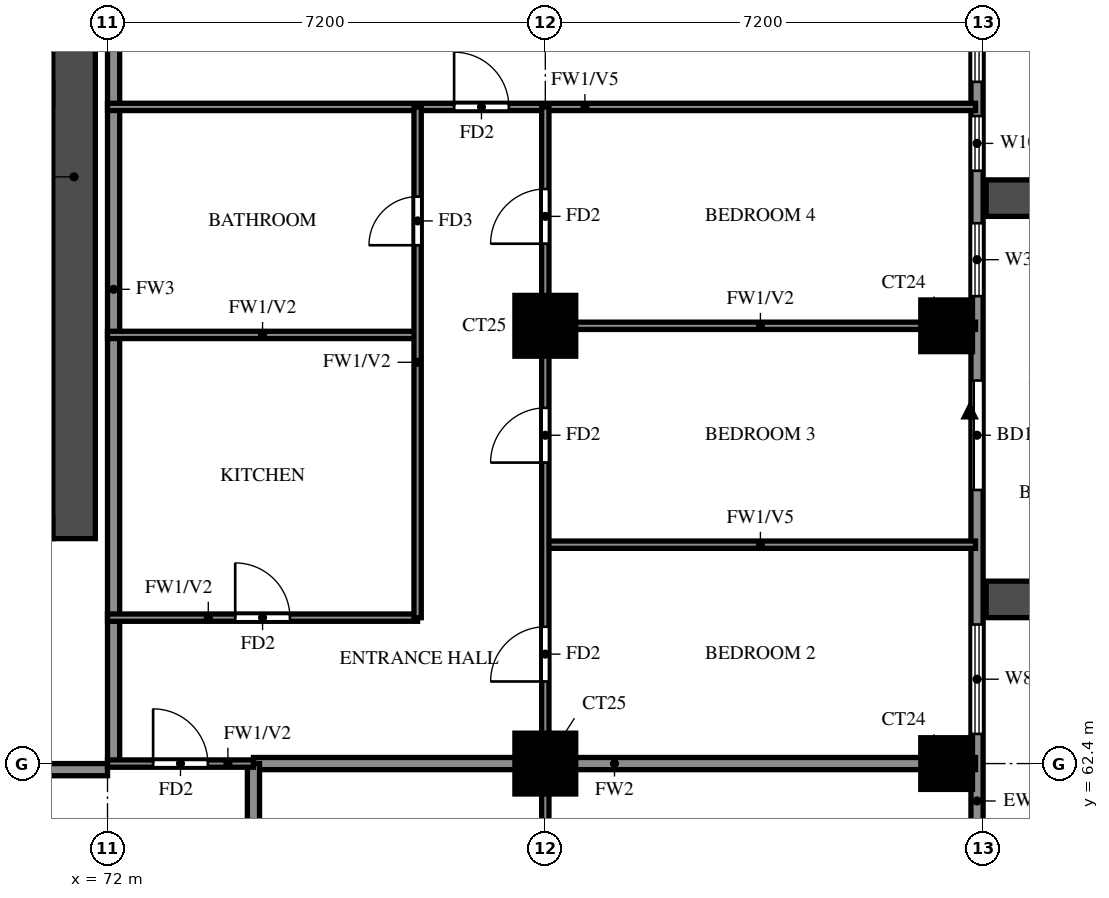
"""IFC4 building model, lengths in metres.
Left out: names, types, materials, properties, quantities, classifications, styles, units other than length and angle.
Written with IfcOpenShell. Run it as: python <this file> out.ifc"""

import sys

from ifc_helpers import new_model, si_unit, direction, frame, frame_2d, origin, origin_2d, place, context, subcontext, project, spatial, rectangle, extrude, source, transform, mapped, element, fill, save


model = new_model("IFC4")
c1 = context("Model", 3, precision=1e-05, world=origin(), true_north=direction((0.0, 1.0)))
c2 = subcontext(c1, "Body", "Model", "MODEL_VIEW")
j1 = project(units=[si_unit("LENGTHUNIT", "METRE"), si_unit("PLANEANGLEUNIT", "RADIAN")], contexts=[c1])
p1 = place(None, origin())
s1 = spatial("IfcSite", under=j1, at=p1, CompositionType="ELEMENT")
p2 = place(p1, origin())
s2 = spatial("IfcBuilding", under=s1, at=p2, CompositionType="ELEMENT")
p3 = place(p2, frame((0.0, 0.0, 160.5)))
s3 = spatial("IfcBuildingStorey", under=s2, at=p3, CompositionType="ELEMENT", Elevation=160.5)
m1 = source(origin(), c2, "Body", "SweptSolid", [
    extrude(rectangle(XDim=1.0, YDim=1.0, at=origin_2d()), origin(), (0.0, 0.0, 1.0), 3.2),
])
p4 = place(p3, frame((79.2, 62.4, 0.0), z_axis=(0.0, 0.0, 1.0), x_axis=(1.0, 0.0, 0.0)))
e1 = element("IfcColumn", 1, at=p4, inside=s3, PredefinedType="COLUMN", context=c2, shape_type="MappedRepresentation", body=[
    mapped(m1, transform((0.0, 0.0, 0.0))),
])
m2 = source(origin(), c2, "Body", "SweptSolid", [
    extrude(rectangle(XDim=0.85, YDim=0.85, at=origin_2d()), origin(), (0.0, 0.0, 1.0), 3.2),
])
p5 = place(p3, frame((85.8, 62.4, 0.0), z_axis=(0.0, 0.0, 1.0), x_axis=(1.0, 0.0, 0.0)))
e2 = element("IfcColumn", 2, at=p5, inside=s3, PredefinedType="COLUMN", context=c2, shape_type="MappedRepresentation", body=[
    mapped(m2, transform((0.0, 0.0, 0.0))),
])
p6 = place(p3, frame((79.2, 69.6, 0.0), z_axis=(0.0, 0.0, 1.0), x_axis=(1.0, 0.0, 0.0)))
e3 = element("IfcColumn", 3, at=p6, inside=s3, PredefinedType="COLUMN", context=c2, shape_type="MappedRepresentation", body=[
    mapped(m1, transform((0.0, 0.0, 0.0))),
])
p7 = place(p3, frame((85.8, 69.6, 0.0), z_axis=(0.0, 0.0, 1.0), x_axis=(1.0, 0.0, 0.0)))
e4 = element("IfcColumn", 4, at=p7, inside=s3, PredefinedType="COLUMN", context=c2, shape_type="MappedRepresentation", body=[
    mapped(m2, transform((0.0, 0.0, 0.0))),
])
p8 = place(p3, frame((71.45, 66.1, 0.0), z_axis=(0.0, 0.0, 1.0), x_axis=(0.0, 1.0, 0.0)))
e5 = element("IfcWall", 5, at=p8, inside=s3, PredefinedType="SHEAR", context=c2, shape_type="SweptSolid", body=[
    extrude(rectangle(XDim=11.9, YDim=0.7, at=frame_2d((5.95, 0.0))), origin(), (0.0, 0.0, 1.0), 3.2),
])
p9 = place(p3, frame((29.7, 66.275, 0.0), z_axis=(0.0, 0.0, 1.0), x_axis=(1.0, 0.0, 0.0)))
e6 = element("IfcWall", 6, at=p9, inside=s3, PredefinedType="SHEAR", context=c2, shape_type="SweptSolid", body=[
    extrude(rectangle(XDim=41.4, YDim=0.35, at=frame_2d((20.7, 0.0))), origin(), (0.0, 0.0, 1.0), 3.2),
])
p10 = place(p9, frame((0.925, 0.0, 0.0)))
e7 = element("IfcOpeningElement", 7, at=p10, cuts=e6, PredefinedType="OPENING", context=c2, shape_type="SweptSolid", body=[
    extrude(rectangle(XDim=1.1, YDim=2.1, at=frame_2d((0.55, 1.05))), frame((0.0, 0.185, 0.0), z_axis=(0.0, -1.0, 0.0), x_axis=(1.0, 0.0, 0.0)), (0.0, 0.0, 1.0), 0.37),
])
p11 = place(p9, frame((3.712, 0.0, 0.0)))
e8 = element("IfcOpeningElement", 8, at=p11, cuts=e6, PredefinedType="OPENING", context=c2, shape_type="SweptSolid", body=[
    extrude(rectangle(XDim=1.8, YDim=2.1, at=frame_2d((0.9, 1.05))), frame((0.0, 0.185, 0.0), z_axis=(0.0, -1.0, 0.0), x_axis=(1.0, 0.0, 0.0)), (0.0, 0.0, 1.0), 0.37),
])
p12 = place(p3, frame((86.3, 48.2, 0.0), z_axis=(0.0, 0.0, 1.0), x_axis=(0.0, 1.0, 0.0)))
e9 = element("IfcWall", 9, at=p12, inside=s3, PredefinedType="SOLIDWALL", context=c2, shape_type="SweptSolid", body=[
    extrude(rectangle(XDim=28.6, YDim=0.2, at=frame_2d((14.3, 0.0))), origin(), (0.0, 0.0, 1.0), 3.2),
])
p13 = place(p12, frame((4.3, 0.0, 0.0)))
e10 = element("IfcOpeningElement", 10, at=p13, cuts=e9, PredefinedType="OPENING", context=c2, shape_type="SweptSolid", body=[
    extrude(rectangle(XDim=1.8, YDim=2.4, at=frame_2d((0.9, 1.2))), frame((0.0, 0.11, 0.0), z_axis=(0.0, -1.0, 0.0), x_axis=(1.0, 0.0, 0.0)), (0.0, 0.0, 1.0), 0.22),
])
p14 = place(p12, frame((18.7, 0.0, 0.0)))
e11 = element("IfcOpeningElement", 11, at=p14, cuts=e9, PredefinedType="OPENING", context=c2, shape_type="SweptSolid", body=[
    extrude(rectangle(XDim=1.8, YDim=2.4, at=frame_2d((0.9, 1.2))), frame((0.0, 0.11, 0.0), z_axis=(0.0, -1.0, 0.0), x_axis=(1.0, 0.0, 0.0)), (0.0, 0.0, 1.0), 0.22),
])
p15 = place(p12, frame((0.6, 0.0, 0.6)))
e12 = element("IfcOpeningElement", 12, at=p15, cuts=e9, PredefinedType="OPENING", context=c2, shape_type="SweptSolid", body=[
    extrude(rectangle(XDim=1.2, YDim=2.4, at=frame_2d((0.6, 1.2))), frame((0.0, 0.11, 0.0), z_axis=(0.0, -1.0, 0.0), x_axis=(1.0, 0.0, 0.0)), (0.0, 0.0, 1.0), 0.22),
])
p16 = place(p12, frame((7.488, 0.0, 0.6)))
e13 = element("IfcOpeningElement", 13, at=p16, cuts=e9, PredefinedType="OPENING", context=c2, shape_type="SweptSolid", body=[
    extrude(rectangle(XDim=1.2, YDim=2.4, at=frame_2d((0.6, 1.2))), frame((0.0, 0.11, 0.0), z_axis=(0.0, -1.0, 0.0), x_axis=(1.0, 0.0, 0.0)), (0.0, 0.0, 1.0), 0.22),
])
p17 = place(p12, frame((10.413, 0.0, 0.6)))
e14 = element("IfcOpeningElement", 14, at=p17, cuts=e9, PredefinedType="OPENING", context=c2, shape_type="SweptSolid", body=[
    extrude(rectangle(XDim=2.4, YDim=2.4, at=frame_2d((1.2, 1.2))), frame((0.0, 0.11, 0.0), z_axis=(0.0, -1.0, 0.0), x_axis=(1.0, 0.0, 0.0)), (0.0, 0.0, 1.0), 0.22),
])
p18 = place(p12, frame((14.688, 0.0, 0.6)))
e15 = element("IfcOpeningElement", 15, at=p18, cuts=e9, PredefinedType="OPENING", context=c2, shape_type="SweptSolid", body=[
    extrude(rectangle(XDim=1.8, YDim=2.4, at=frame_2d((0.9, 1.2))), frame((0.0, 0.11, 0.0), z_axis=(0.0, -1.0, 0.0), x_axis=(1.0, 0.0, 0.0)), (0.0, 0.0, 1.0), 0.22),
])
p19 = place(p12, frame((21.887, 0.0, 0.6)))
e16 = element("IfcOpeningElement", 16, at=p19, cuts=e9, PredefinedType="OPENING", context=c2, shape_type="SweptSolid", body=[
    extrude(rectangle(XDim=1.2, YDim=2.4, at=frame_2d((0.6, 1.2))), frame((0.0, 0.11, 0.0), z_axis=(0.0, -1.0, 0.0), x_axis=(1.0, 0.0, 0.0)), (0.0, 0.0, 1.0), 0.22),
])
p20 = place(p12, frame((23.95, 0.0, 0.6)))
e17 = element("IfcOpeningElement", 17, at=p20, cuts=e9, PredefinedType="OPENING", context=c2, shape_type="SweptSolid", body=[
    extrude(rectangle(XDim=0.9, YDim=2.4, at=frame_2d((0.45, 1.2))), frame((0.0, 0.11, 0.0), z_axis=(0.0, -1.0, 0.0), x_axis=(1.0, 0.0, 0.0)), (0.0, 0.0, 1.0), 0.22),
])
p21 = place(p12, frame((25.413, 0.0, 0.6)))
e18 = element("IfcOpeningElement", 18, at=p21, cuts=e9, PredefinedType="OPENING", context=c2, shape_type="SweptSolid", body=[
    extrude(rectangle(XDim=2.4, YDim=2.4, at=frame_2d((1.2, 1.2))), frame((0.0, 0.11, 0.0), z_axis=(0.0, -1.0, 0.0), x_axis=(1.0, 0.0, 0.0)), (0.0, 0.0, 1.0), 0.22),
])
for number, where, z_axis, x_axis in (
    (19, (86.45, 65.1, 0.0), (0.0, 0.0, 1.0), (1.0, 0.0, 0.0)),
    (20, (86.45, 71.7, 0.0), (0.0, 0.0, 1.0), (1.0, 0.0, 0.0)),
):
    element("IfcWall", number, at=place(p3, frame(where, z_axis=z_axis, x_axis=x_axis)), inside=s3, PredefinedType="SOLIDWALL", context=c2, shape_type="SweptSolid", body=[
        extrude(rectangle(XDim=2.65, YDim=0.6, at=frame_2d((1.325, 0.0))), origin(), (0.0, 0.0, 1.0), 2.85),
    ])
p22 = place(p3, frame((67.2, 62.3, 0.0), z_axis=(0.0, 0.0, 1.0), x_axis=(1.0, 0.0, 0.0)))
e21 = element("IfcWall", 21, at=p22, inside=s3, PredefinedType="SOLIDWALL", context=c2, shape_type="SweptSolid", body=[
    extrude(rectangle(XDim=4.8, YDim=0.2, at=frame_2d((2.4, 0.0))), origin(), (0.0, 0.0, 1.0), 3.2),
])
p23 = place(p3, frame((72.1, 62.4, 0.0), z_axis=(0.0, 0.0, 1.0), x_axis=(0.0, 1.0, 0.0)))
e22 = element("IfcWall", 22, at=p23, inside=s3, PredefinedType="SOLIDWALL", context=c2, shape_type="SweptSolid", body=[
    extrude(rectangle(XDim=15.6, YDim=0.2, at=frame_2d((7.8, 0.0))), origin(), (0.0, 0.0, 1.0), 3.2),
])
p24 = place(p3, frame((74.4, 62.4, 0.0), z_axis=(0.0, 0.0, 1.0), x_axis=(1.0, 0.0, 0.0)))
e23 = element("IfcWall", 23, at=p24, inside=s3, PredefinedType="SOLIDWALL", context=c2, shape_type="SweptSolid", body=[
    extrude(rectangle(XDim=11.875, YDim=0.2, at=frame_2d((5.938, 0.0))), origin(), (0.0, 0.0, 1.0), 3.2),
])
p25 = place(p3, frame((74.4, 60.0, 0.0), z_axis=(0.0, 0.0, 1.0), x_axis=(0.0, 1.0, 0.0)))
e24 = element("IfcWall", 24, at=p25, inside=s3, PredefinedType="SOLIDWALL", context=c2, shape_type="SweptSolid", body=[
    extrude(rectangle(XDim=2.4, YDim=0.2, at=frame_2d((1.2, 0.0))), origin(), (0.0, 0.0, 1.0), 3.2),
])
p26 = place(p3, frame((72.0, 62.4, 0.0), z_axis=(0.0, 0.0, 1.0), x_axis=(1.0, 0.0, 0.0)))
e25 = element("IfcWall", 25, at=p26, inside=s3, PredefinedType="PARTITIONING", context=c2, shape_type="SweptSolid", body=[
    extrude(rectangle(XDim=2.4, YDim=0.12, at=frame_2d((1.2, 0.0))), origin(), (0.0, 0.0, 1.0), 3.2),
])
p27 = place(p26, frame((0.75, 0.0, 0.0)))
e26 = element("IfcOpeningElement", 26, at=p27, cuts=e25, PredefinedType="OPENING", context=c2, shape_type="SweptSolid", body=[
    extrude(rectangle(XDim=0.9, YDim=2.1, at=frame_2d((0.45, 1.05))), frame((0.0, 0.07, 0.0), z_axis=(0.0, -1.0, 0.0), x_axis=(1.0, 0.0, 0.0)), (0.0, 0.0, 1.0), 0.14),
])
p28 = place(p3, frame((72.0, 64.8, 0.0), z_axis=(0.0, 0.0, 1.0), x_axis=(1.0, 0.0, 0.0)))
e27 = element("IfcWall", 27, at=p28, inside=s3, PredefinedType="PARTITIONING", context=c2, shape_type="SweptSolid", body=[
    extrude(rectangle(XDim=5.1, YDim=0.12, at=frame_2d((2.55, 0.0))), origin(), (0.0, 0.0, 1.0), 3.2),
])
p29 = place(p28, frame((2.1, 0.0, 0.0)))
e28 = element("IfcOpeningElement", 28, at=p29, cuts=e27, PredefinedType="OPENING", context=c2, shape_type="SweptSolid", body=[
    extrude(rectangle(XDim=0.9, YDim=2.1, at=frame_2d((0.45, 1.05))), frame((0.0, 0.07, 0.0), z_axis=(0.0, -1.0, 0.0), x_axis=(1.0, 0.0, 0.0)), (0.0, 0.0, 1.0), 0.14),
])
p30 = place(p3, frame((79.2, 66.0, 0.0), z_axis=(0.0, 0.0, 1.0), x_axis=(1.0, 0.0, 0.0)))
e29 = element("IfcWall", 29, at=p30, inside=s3, PredefinedType="PARTITIONING", context=c2, shape_type="SweptSolid", body=[
    extrude(rectangle(XDim=7.075, YDim=0.12, at=frame_2d((3.538, 0.0))), origin(), (0.0, 0.0, 1.0), 2.3),
])
p31 = place(p3, frame((72.0, 69.45, 0.0), z_axis=(0.0, 0.0, 1.0), x_axis=(1.0, 0.0, 0.0)))
e30 = element("IfcWall", 30, at=p31, inside=s3, PredefinedType="PARTITIONING", context=c2, shape_type="SweptSolid", body=[
    extrude(rectangle(XDim=5.1, YDim=0.12, at=frame_2d((2.55, 0.0))), origin(), (0.0, 0.0, 1.0), 3.2),
])
p32 = place(p3, frame((79.2, 69.6, 0.0), z_axis=(0.0, 0.0, 1.0), x_axis=(1.0, 0.0, 0.0)))
e31 = element("IfcWall", 31, at=p32, inside=s3, PredefinedType="PARTITIONING", context=c2, shape_type="SweptSolid", body=[
    extrude(rectangle(XDim=7.075, YDim=0.12, at=frame_2d((3.538, 0.0))), origin(), (0.0, 0.0, 1.0), 3.2),
])
p33 = place(p3, frame((72.0, 73.2, 0.0), z_axis=(0.0, 0.0, 1.0), x_axis=(1.0, 0.0, 0.0)))
e32 = element("IfcWall", 32, at=p33, inside=s3, PredefinedType="PARTITIONING", context=c2, shape_type="SweptSolid", body=[
    extrude(rectangle(XDim=14.275, YDim=0.12, at=frame_2d((7.137, 0.0))), origin(), (0.0, 0.0, 1.0), 2.3),
])
p34 = place(p33, frame((5.7, 0.0, 0.0)))
e33 = element("IfcOpeningElement", 33, at=p34, cuts=e32, PredefinedType="OPENING", context=c2, shape_type="SweptSolid", body=[
    extrude(rectangle(XDim=0.9, YDim=2.1, at=frame_2d((0.45, 1.05))), frame((0.0, 0.07, 0.0), z_axis=(0.0, -1.0, 0.0), x_axis=(1.0, 0.0, 0.0)), (0.0, 0.0, 1.0), 0.14),
])
p35 = place(p3, frame((77.1, 64.8, 0.0), z_axis=(0.0, 0.0, 1.0), x_axis=(0.0, 1.0, 0.0)))
e34 = element("IfcWall", 34, at=p35, inside=s3, PredefinedType="PARTITIONING", context=c2, shape_type="SweptSolid", body=[
    extrude(rectangle(XDim=8.4, YDim=0.12, at=frame_2d((4.2, 0.0))), origin(), (0.0, 0.0, 1.0), 3.2),
])
p36 = place(p35, frame((6.125, 0.0, 0.0)))
e35 = element("IfcOpeningElement", 35, at=p36, cuts=e34, PredefinedType="OPENING", context=c2, shape_type="SweptSolid", body=[
    extrude(rectangle(XDim=0.8, YDim=2.1, at=frame_2d((0.4, 1.05))), frame((0.0, 0.07, 0.0), z_axis=(0.0, -1.0, 0.0), x_axis=(1.0, 0.0, 0.0)), (0.0, 0.0, 1.0), 0.14),
])
p37 = place(p3, frame((79.2, 48.125, 0.0), z_axis=(0.0, 0.0, 1.0), x_axis=(0.0, 1.0, 0.0)))
e36 = element("IfcWall", 36, at=p37, inside=s3, PredefinedType="PARTITIONING", context=c2, shape_type="SweptSolid", body=[
    extrude(rectangle(XDim=25.075, YDim=0.12, at=frame_2d((12.538, 0.0))), origin(), (0.0, 0.0, 1.0), 3.2),
])
p38 = place(p37, frame((1.288, 0.0, 0.0)))
e37 = element("IfcOpeningElement", 37, at=p38, cuts=e36, PredefinedType="OPENING", context=c2, shape_type="SweptSolid", body=[
    extrude(rectangle(XDim=0.9, YDim=2.1, at=frame_2d((0.45, 1.05))), frame((0.0, 0.07, 0.0), z_axis=(0.0, -1.0, 0.0), x_axis=(1.0, 0.0, 0.0)), (0.0, 0.0, 1.0), 0.14),
])
p39 = place(p37, frame((4.825, 0.0, 0.0)))
e38 = element("IfcOpeningElement", 38, at=p39, cuts=e36, PredefinedType="OPENING", context=c2, shape_type="SweptSolid", body=[
    extrude(rectangle(XDim=0.9, YDim=2.1, at=frame_2d((0.45, 1.05))), frame((0.0, 0.07, 0.0), z_axis=(0.0, -1.0, 0.0), x_axis=(1.0, 0.0, 0.0)), (0.0, 0.0, 1.0), 0.14),
])
p40 = place(p37, frame((9.925, 0.0, 0.0)))
e39 = element("IfcOpeningElement", 39, at=p40, cuts=e36, PredefinedType="OPENING", context=c2, shape_type="SweptSolid", body=[
    extrude(rectangle(XDim=1.5, YDim=2.1, at=frame_2d((0.75, 1.05))), frame((0.0, 0.07, 0.0), z_axis=(0.0, -1.0, 0.0), x_axis=(1.0, 0.0, 0.0)), (0.0, 0.0, 1.0), 0.14),
])
p41 = place(p37, frame((15.625, 0.0, 0.0)))
e40 = element("IfcOpeningElement", 40, at=p41, cuts=e36, PredefinedType="OPENING", context=c2, shape_type="SweptSolid", body=[
    extrude(rectangle(XDim=0.9, YDim=2.1, at=frame_2d((0.45, 1.05))), frame((0.0, 0.07, 0.0), z_axis=(0.0, -1.0, 0.0), x_axis=(1.0, 0.0, 0.0)), (0.0, 0.0, 1.0), 0.14),
])
p42 = place(p37, frame((19.225, 0.0, 0.0)))
e41 = element("IfcOpeningElement", 41, at=p42, cuts=e36, PredefinedType="OPENING", context=c2, shape_type="SweptSolid", body=[
    extrude(rectangle(XDim=0.9, YDim=2.1, at=frame_2d((0.45, 1.05))), frame((0.0, 0.07, 0.0), z_axis=(0.0, -1.0, 0.0), x_axis=(1.0, 0.0, 0.0)), (0.0, 0.0, 1.0), 0.14),
])
p43 = place(p37, frame((22.825, 0.0, 0.0)))
e42 = element("IfcOpeningElement", 42, at=p43, cuts=e36, PredefinedType="OPENING", context=c2, shape_type="SweptSolid", body=[
    extrude(rectangle(XDim=0.9, YDim=2.1, at=frame_2d((0.45, 1.05))), frame((0.0, 0.07, 0.0), z_axis=(0.0, -1.0, 0.0), x_axis=(1.0, 0.0, 0.0)), (0.0, 0.0, 1.0), 0.14),
])
p44 = place(p14, origin())
e43 = element("IfcDoor", 43, at=p44, inside=s3, OperationType="DOUBLE_DOOR_SLIDING", PredefinedType="DOOR", context=c2, shape_type="SweptSolid", body=[
    extrude(rectangle(XDim=1.8, YDim=2.4, at=frame_2d((0.9, 1.2))), frame((0.0, 0.025, 0.0), z_axis=(0.0, -1.0, 0.0), x_axis=(1.0, 0.0, 0.0)), (0.0, 0.0, 1.0), 0.05),
])
fill(e11, e43)
p45 = place(p18, origin())
e44 = element("IfcWindow", 44, at=p45, inside=s3, PartitioningType="DOUBLE_PANEL_VERTICAL", PredefinedType="WINDOW", context=c2, shape_type="SweptSolid", body=[
    extrude(rectangle(XDim=1.8, YDim=2.4, at=frame_2d((0.9, 1.2))), frame((0.0, 0.03, 0.0), z_axis=(0.0, -1.0, 0.0), x_axis=(1.0, 0.0, 0.0)), (0.0, 0.0, 1.0), 0.06),
])
fill(e15, e44)
p46 = place(p19, origin())
e45 = element("IfcWindow", 45, at=p46, inside=s3, PartitioningType="SINGLE_PANEL", PredefinedType="WINDOW", context=c2, shape_type="SweptSolid", body=[
    extrude(rectangle(XDim=1.2, YDim=2.4, at=frame_2d((0.6, 1.2))), frame((0.0, 0.03, 0.0), z_axis=(0.0, -1.0, 0.0), x_axis=(1.0, 0.0, 0.0)), (0.0, 0.0, 1.0), 0.06),
])
fill(e16, e45)
p47 = place(p20, origin())
e46 = element("IfcWindow", 46, at=p47, inside=s3, PartitioningType="SINGLE_PANEL", PredefinedType="WINDOW", context=c2, shape_type="SweptSolid", body=[
    extrude(rectangle(XDim=0.9, YDim=2.4, at=frame_2d((0.45, 1.2))), frame((0.0, 0.03, 0.0), z_axis=(0.0, -1.0, 0.0), x_axis=(1.0, 0.0, 0.0)), (0.0, 0.0, 1.0), 0.06),
])
fill(e17, e46)
p48 = place(p21, origin())
e47 = element("IfcWindow", 47, at=p48, inside=s3, PartitioningType="DOUBLE_PANEL_VERTICAL", PredefinedType="WINDOW", context=c2, shape_type="SweptSolid", body=[
    extrude(rectangle(XDim=2.4, YDim=2.4, at=frame_2d((1.2, 1.2))), frame((0.0, 0.03, 0.0), z_axis=(0.0, -1.0, 0.0), x_axis=(1.0, 0.0, 0.0)), (0.0, 0.0, 1.0), 0.06),
])
fill(e18, e47)
p49 = place(p27, origin())
e48 = element("IfcDoor", 48, at=p49, inside=s3, OperationType="SINGLE_SWING_RIGHT", PredefinedType="DOOR", context=c2, shape_type="SweptSolid", body=[
    extrude(rectangle(XDim=0.9, YDim=2.1, at=frame_2d((0.45, 1.05))), frame((0.0, 0.025, 0.0), z_axis=(0.0, -1.0, 0.0), x_axis=(1.0, 0.0, 0.0)), (0.0, 0.0, 1.0), 0.05),
])
fill(e26, e48)
p50 = place(p41, origin())
e49 = element("IfcDoor", 49, at=p50, inside=s3, OperationType="SINGLE_SWING_LEFT", PredefinedType="DOOR", context=c2, shape_type="SweptSolid", body=[
    extrude(rectangle(XDim=0.9, YDim=2.1, at=frame_2d((0.45, 1.05))), frame((0.0, 0.025, 0.0), z_axis=(0.0, -1.0, 0.0), x_axis=(1.0, 0.0, 0.0)), (0.0, 0.0, 1.0), 0.05),
])
fill(e40, e49)
p51 = place(p42, origin())
e50 = element("IfcDoor", 50, at=p51, inside=s3, OperationType="SINGLE_SWING_RIGHT", PredefinedType="DOOR", context=c2, shape_type="SweptSolid", body=[
    extrude(rectangle(XDim=0.9, YDim=2.1, at=frame_2d((0.45, 1.05))), frame((0.0, 0.025, 0.0), z_axis=(0.0, -1.0, 0.0), x_axis=(1.0, 0.0, 0.0)), (0.0, 0.0, 1.0), 0.05),
])
fill(e41, e50)
p52 = place(p43, origin())
e51 = element("IfcDoor", 51, at=p52, inside=s3, OperationType="SINGLE_SWING_LEFT", PredefinedType="DOOR", context=c2, shape_type="SweptSolid", body=[
    extrude(rectangle(XDim=0.9, YDim=2.1, at=frame_2d((0.45, 1.05))), frame((0.0, 0.025, 0.0), z_axis=(0.0, -1.0, 0.0), x_axis=(1.0, 0.0, 0.0)), (0.0, 0.0, 1.0), 0.05),
])
fill(e42, e51)
p53 = place(p34, origin())
e52 = element("IfcDoor", 52, at=p53, inside=s3, OperationType="SINGLE_SWING_LEFT", PredefinedType="DOOR", context=c2, shape_type="SweptSolid", body=[
    extrude(rectangle(XDim=0.9, YDim=2.1, at=frame_2d((0.45, 1.05))), frame((0.0, 0.025, 0.0), z_axis=(0.0, -1.0, 0.0), x_axis=(1.0, 0.0, 0.0)), (0.0, 0.0, 1.0), 0.05),
])
fill(e33, e52)
p54 = place(p29, origin())
e53 = element("IfcDoor", 53, at=p54, inside=s3, OperationType="SINGLE_SWING_RIGHT", PredefinedType="DOOR", context=c2, shape_type="SweptSolid", body=[
    extrude(rectangle(XDim=0.9, YDim=2.1, at=frame_2d((0.45, 1.05))), frame((0.0, 0.025, 0.0), z_axis=(0.0, -1.0, 0.0), x_axis=(1.0, 0.0, 0.0)), (0.0, 0.0, 1.0), 0.05),
])
fill(e28, e53)
p55 = place(p36, origin())
e54 = element("IfcDoor", 54, at=p55, inside=s3, OperationType="SINGLE_SWING_LEFT", PredefinedType="DOOR", context=c2, shape_type="SweptSolid", body=[
    extrude(rectangle(XDim=0.8, YDim=2.1, at=frame_2d((0.4, 1.05))), frame((0.0, 0.025, 0.0), z_axis=(0.0, -1.0, 0.0), x_axis=(1.0, 0.0, 0.0)), (0.0, 0.0, 1.0), 0.05),
])
fill(e35, e54)
save(model, sys.argv[1])
